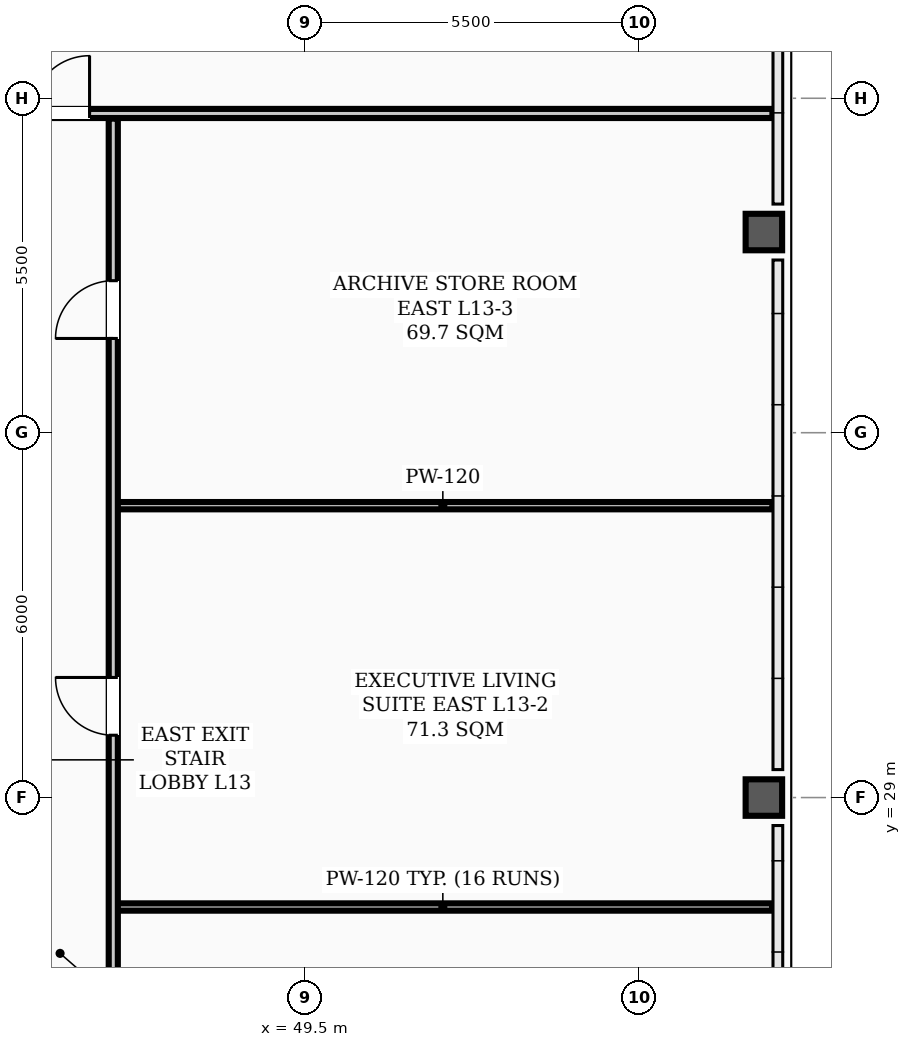
"""IFC4 building model, lengths in metres.
Left out: names, types, materials, properties, quantities, classifications, styles, units other than length and angle.
Written with IfcOpenShell. Run it as: python <this file> out.ifc"""

import sys

from ifc_helpers import new_model, si_unit, direction, frame, frame_2d, origin, origin_2d, place, context, subcontext, project, spatial, rectangle, hollow_rectangle, extrude, element, fill, save


model = new_model("IFC4")
c1 = context("Model", 3, precision=1e-05, world=origin(), true_north=direction((0.0, 1.0)))
c2 = subcontext(c1, "Body", "Model", "MODEL_VIEW")
j1 = project(units=[si_unit("LENGTHUNIT", "METRE"), si_unit("PLANEANGLEUNIT", "RADIAN")], contexts=[c1])
p1 = place(None, origin())
s1 = spatial("IfcSite", under=j1, at=p1, CompositionType="ELEMENT")
p2 = place(p1, origin())
s2 = spatial("IfcBuilding", under=s1, at=p2, CompositionType="ELEMENT")
p3 = place(p2, frame((0.0, 0.0, 53.8)))
s3 = spatial("IfcBuildingStorey", under=s2, at=p3, CompositionType="ELEMENT", Elevation=53.8)
for number, where, z_axis, x_axis in (
    (1, (57.05, 29.0, 0.0), (0.0, 0.0, 1.0), (1.0, 0.0, 0.0)),
    (2, (57.05, 38.3, 0.0), (0.0, 0.0, 1.0), (1.0, 0.0, 0.0)),
):
    element("IfcColumn", number, at=place(p3, frame(where, z_axis=z_axis, x_axis=x_axis)), inside=s3, PredefinedType="COLUMN", context=c2, shape_type="SweptSolid", body=[
        extrude(hollow_rectangle(XDim=0.6, YDim=0.6, WallThickness=0.026, InnerFilletRadius=0.013, OuterFilletRadius=0.039, at=origin_2d()), origin(), (0.0, 0.0, 1.0), 3.9),
    ])
for number, where, z_axis, x_axis in (
    (3, (46.35, 27.2, 0.0), (0.0, 0.0, 1.0), (1.0, 0.0, 0.0)),
    (4, (46.35, 33.8, 0.0), (0.0, 0.0, 1.0), (1.0, 0.0, 0.0)),
):
    element("IfcWall", number, at=place(p3, frame(where, z_axis=z_axis, x_axis=x_axis)), inside=s3, PredefinedType="PARTITIONING", context=c2, shape_type="SweptSolid", body=[
        extrude(rectangle(XDim=10.84, YDim=0.12, at=frame_2d((5.42, 0.0))), origin(), (0.0, 0.0, 1.0), 3.212),
    ])
p4 = place(p3, frame((7.81, 40.25, 0.0), z_axis=(0.0, 0.0, 1.0), x_axis=(1.0, 0.0, 0.0)))
e5 = element("IfcWall", 5, at=p4, inside=s3, PredefinedType="PARTITIONING", context=c2, shape_type="SweptSolid", body=[
    extrude(rectangle(XDim=49.38, YDim=0.15, at=frame_2d((24.69, 0.0))), origin(), (0.0, 0.0, 1.0), 3.1),
])
p5 = place(p4, frame((3.73, 0.0, 0.0)))
e6 = element("IfcOpeningElement", 6, at=p5, cuts=e5, PredefinedType="OPENING", context=c2, shape_type="SweptSolid", body=[
    extrude(rectangle(XDim=0.95, YDim=2.08, at=frame_2d((0.475, 1.04))), frame((0.0, 0.085, 0.0), z_axis=(0.0, -1.0, 0.0), x_axis=(1.0, 0.0, 0.0)), (0.0, 0.0, 1.0), 0.17),
])
p6 = place(p4, frame((13.815, 0.0, 0.0)))
e7 = element("IfcOpeningElement", 7, at=p6, cuts=e5, PredefinedType="OPENING", context=c2, shape_type="SweptSolid", body=[
    extrude(rectangle(XDim=0.95, YDim=2.08, at=frame_2d((0.475, 1.04))), frame((0.0, 0.085, 0.0), z_axis=(0.0, -1.0, 0.0), x_axis=(1.0, 0.0, 0.0)), (0.0, 0.0, 1.0), 0.17),
])
p7 = place(p4, frame((19.965, 0.0, 0.0)))
e8 = element("IfcOpeningElement", 8, at=p7, cuts=e5, PredefinedType="OPENING", context=c2, shape_type="SweptSolid", body=[
    extrude(rectangle(XDim=0.95, YDim=2.08, at=frame_2d((0.475, 1.04))), frame((0.0, 0.085, 0.0), z_axis=(0.0, -1.0, 0.0), x_axis=(1.0, 0.0, 0.0)), (0.0, 0.0, 1.0), 0.17),
])
p8 = place(p4, frame((30.815, 0.0, 0.0)))
e9 = element("IfcOpeningElement", 9, at=p8, cuts=e5, PredefinedType="OPENING", context=c2, shape_type="SweptSolid", body=[
    extrude(rectangle(XDim=0.95, YDim=2.08, at=frame_2d((0.475, 1.04))), frame((0.0, 0.085, 0.0), z_axis=(0.0, -1.0, 0.0), x_axis=(1.0, 0.0, 0.0)), (0.0, 0.0, 1.0), 0.17),
])
p9 = place(p4, frame((37.2, 0.0, 0.0)))
e10 = element("IfcOpeningElement", 10, at=p9, cuts=e5, PredefinedType="OPENING", context=c2, shape_type="SweptSolid", body=[
    extrude(rectangle(XDim=0.95, YDim=2.08, at=frame_2d((0.475, 1.04))), frame((0.0, 0.085, 0.0), z_axis=(0.0, -1.0, 0.0), x_axis=(1.0, 0.0, 0.0)), (0.0, 0.0, 1.0), 0.17),
])
p10 = place(p3, frame((46.35, 17.635, 0.0), z_axis=(0.0, 0.0, 1.0), x_axis=(0.0, 1.0, 0.0)))
e11 = element("IfcWall", 11, at=p10, inside=s3, PredefinedType="PARTITIONING", context=c2, shape_type="SweptSolid", body=[
    extrude(rectangle(XDim=22.53, YDim=0.15, at=frame_2d((11.265, 0.0))), origin(), (0.0, 0.0, 1.0), 3.0),
])
p11 = place(p10, frame((4.265, 0.0, 0.0)))
e12 = element("IfcOpeningElement", 12, at=p11, cuts=e11, PredefinedType="OPENING", context=c2, shape_type="SweptSolid", body=[
    extrude(rectangle(XDim=0.95, YDim=2.08, at=frame_2d((0.475, 1.04))), frame((0.0, 0.085, 0.0), z_axis=(0.0, -1.0, 0.0), x_axis=(1.0, 0.0, 0.0)), (0.0, 0.0, 1.0), 0.17),
])
p12 = place(p10, frame((12.39, 0.0, 0.0)))
e13 = element("IfcOpeningElement", 13, at=p12, cuts=e11, PredefinedType="OPENING", context=c2, shape_type="SweptSolid", body=[
    extrude(rectangle(XDim=0.95, YDim=2.08, at=frame_2d((0.475, 1.04))), frame((0.0, 0.085, 0.0), z_axis=(0.0, -1.0, 0.0), x_axis=(1.0, 0.0, 0.0)), (0.0, 0.0, 1.0), 0.17),
])
p13 = place(p10, frame((18.915, 0.0, 0.0)))
e14 = element("IfcOpeningElement", 14, at=p13, cuts=e11, PredefinedType="OPENING", context=c2, shape_type="SweptSolid", body=[
    extrude(rectangle(XDim=0.95, YDim=2.08, at=frame_2d((0.475, 1.04))), frame((0.0, 0.085, 0.0), z_axis=(0.0, -1.0, 0.0), x_axis=(1.0, 0.0, 0.0)), (0.0, 0.0, 1.0), 0.17),
])
p14 = place(p12, origin())
e15 = element("IfcDoor", 15, at=p14, inside=s3, OperationType="SINGLE_SWING_RIGHT", PredefinedType="DOOR", context=c2, shape_type="SweptSolid", body=[
    extrude(rectangle(XDim=0.95, YDim=2.08, at=frame_2d((0.475, 1.04))), frame((0.0, 0.025, 0.0), z_axis=(0.0, -1.0, 0.0), x_axis=(1.0, 0.0, 0.0)), (0.0, 0.0, 1.0), 0.05),
])
fill(e13, e15)
p15 = place(p13, origin())
e16 = element("IfcDoor", 16, at=p15, inside=s3, OperationType="SINGLE_SWING_LEFT", PredefinedType="DOOR", context=c2, shape_type="SweptSolid", body=[
    extrude(rectangle(XDim=0.95, YDim=2.08, at=frame_2d((0.475, 1.04))), frame((0.0, 0.025, 0.0), z_axis=(0.0, -1.0, 0.0), x_axis=(1.0, 0.0, 0.0)), (0.0, 0.0, 1.0), 0.05),
])
fill(e14, e16)
p16 = place(p9, origin())
e17 = element("IfcDoor", 17, at=p16, inside=s3, OperationType="SINGLE_SWING_RIGHT", PredefinedType="DOOR", context=c2, shape_type="SweptSolid", body=[
    extrude(rectangle(XDim=0.95, YDim=2.08, at=frame_2d((0.475, 1.04))), frame((0.0, 0.025, 0.0), z_axis=(0.0, -1.0, 0.0), x_axis=(1.0, 0.0, 0.0)), (0.0, 0.0, 1.0), 0.05),
])
fill(e10, e17)
save(model, sys.argv[1])
